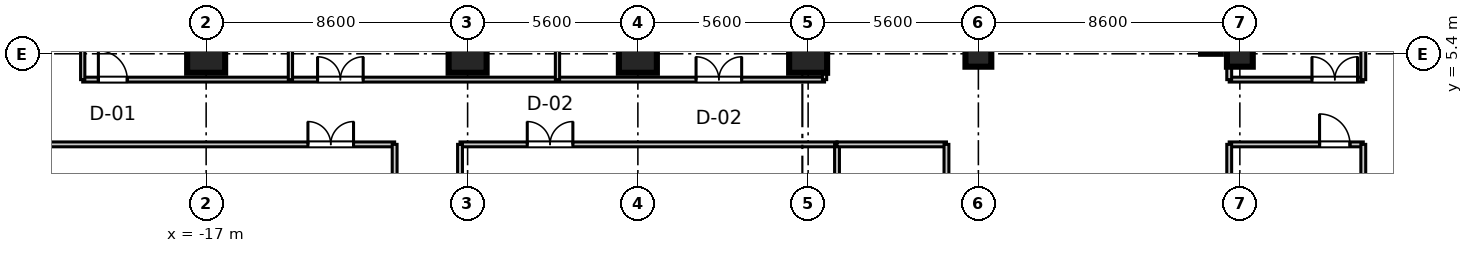
"""IFC4 building model, lengths in metres.
Left out: names, types, materials, properties, quantities, classifications, styles, units other than length and angle.
Written with IfcOpenShell. Run it as: python <this file> out.ifc"""

import sys

from ifc_helpers import new_model, si_unit, direction, frame, frame_2d, origin, origin_2d, place, context, subcontext, project, spatial, rectangle, extrude, source, transform, mapped, element, fill, save


model = new_model("IFC4")
c1 = context("Model", 3, precision=1e-05, world=origin(), true_north=direction((0.0, 1.0)))
c2 = subcontext(c1, "Body", "Model", "MODEL_VIEW")
j1 = project(units=[si_unit("LENGTHUNIT", "METRE"), si_unit("PLANEANGLEUNIT", "RADIAN")], contexts=[c1])
p1 = place(None, origin())
s1 = spatial("IfcSite", under=j1, at=p1, CompositionType="ELEMENT")
p2 = place(p1, origin())
s2 = spatial("IfcBuilding", under=s1, at=p2, CompositionType="ELEMENT")
p3 = place(p2, frame((0.0, 0.0, 110.2)))
s3 = spatial("IfcBuildingStorey", under=s2, at=p3, CompositionType="ELEMENT", Elevation=110.2)
m1 = source(origin(), c2, "Body", "SweptSolid", [
    extrude(rectangle(XDim=1.25, YDim=1.25, at=origin_2d()), origin(), (0.0, 0.0, 1.0), 3.605),
])
for number, where, z_axis, x_axis in (
    (1, (-17.0, 5.4, 0.0), (0.0, 0.0, 1.0), (1.0, 0.0, 0.0)),
    (2, (-8.4, 5.4, 0.0), (0.0, 0.0, 1.0), (1.0, 0.0, 0.0)),
    (3, (-2.8, 5.4, 0.0), (0.0, 0.0, 1.0), (1.0, 0.0, 0.0)),
    (4, (2.8, 5.4, 0.0), (0.0, 0.0, 1.0), (1.0, 0.0, 0.0)),
):
    element("IfcColumn", number, at=place(p3, frame(where, z_axis=z_axis, x_axis=x_axis)), inside=s3, PredefinedType="COLUMN", context=c2, shape_type="MappedRepresentation", body=[
        mapped(m1, transform((0.0, 0.0, 0.0), scale=1.0)),
    ])
m2 = source(origin(), c2, "Body", "SweptSolid", [
    extrude(rectangle(XDim=0.85, YDim=0.85, at=origin_2d()), origin(), (0.0, 0.0, 1.0), 3.605),
])
for number, where, z_axis, x_axis in (
    (5, (8.4, 5.4, 0.0), (0.0, 0.0, 1.0), (1.0, 0.0, 0.0)),
    (6, (17.0, 5.4, 0.0), (0.0, 0.0, 1.0), (1.0, 0.0, 0.0)),
):
    element("IfcColumn", number, at=place(p3, frame(where, z_axis=z_axis, x_axis=x_axis)), inside=s3, PredefinedType="PILASTER", context=c2, shape_type="MappedRepresentation", body=[
        mapped(m2, transform((0.0, 0.0, 0.0), scale=1.0)),
    ])
m3 = source(origin(), c2, "Body", "SweptSolid", [
    extrude(rectangle(XDim=11.6, YDim=0.65, at=frame_2d((5.8, 0.0))), origin(), (0.0, 0.0, 1.0), 3.38),
])
p4 = place(p3, frame((16.05, 5.4, 0.0), z_axis=(0.0, 0.0, 1.0), x_axis=(0.0, 1.0, 0.0)))
e7 = element("IfcWall", 7, at=p4, inside=s3, PredefinedType="SHEAR", context=c2, shape_type="MappedRepresentation", body=[
    mapped(m3, transform((0.0, 0.0, 0.0), scale=1.0)),
])
m4 = source(origin(), c2, "Body", "SweptSolid", [
    extrude(rectangle(XDim=4.41, YDim=0.16, at=frame_2d((2.205, 0.0))), origin(), (0.0, 0.0, 1.0), 2.72),
])
p5 = place(p3, frame((16.65, 4.55, 0.0), z_axis=(0.0, 0.0, 1.0), x_axis=(1.0, 0.0, 0.0)))
e8 = element("IfcWall", 8, at=p5, inside=s3, PredefinedType="PARTITIONING", context=c2, shape_type="MappedRepresentation", body=[
    mapped(m4, transform((0.0, 0.0, 0.0), scale=1.0)),
])
p6 = place(p5, frame((2.722, 0.0, 0.0)))
e9 = element("IfcOpeningElement", 9, at=p6, cuts=e8, PredefinedType="OPENING", context=c2, shape_type="SweptSolid", body=[
    extrude(rectangle(XDim=1.5, YDim=2.15, at=frame_2d((0.75, 1.075))), frame((0.0, 0.09, 0.0), z_axis=(0.0, -1.0, 0.0), x_axis=(1.0, 0.0, 0.0)), (0.0, 0.0, 1.0), 0.18),
])
m5 = source(origin(), c2, "Body", "SweptSolid", [
    extrude(rectangle(XDim=19.25, YDim=0.16, at=frame_2d((9.625, 0.0))), origin(), (0.0, 0.0, 1.0), 2.72),
])
p7 = place(p3, frame((16.65, 4.55, 0.0), z_axis=(0.0, 0.0, 1.0), x_axis=(0.0, 1.0, 0.0)))
e10 = element("IfcWall", 10, at=p7, inside=s3, PredefinedType="PARTITIONING", context=c2, shape_type="MappedRepresentation", body=[
    mapped(m5, transform((0.0, 0.0, 0.0), scale=1.0)),
])
m6 = source(origin(), c2, "Body", "SweptSolid", [
    extrude(rectangle(XDim=17.83, YDim=0.16, at=frame_2d((8.915, 0.0))), origin(), (0.0, 0.0, 1.0), 2.72),
])
p8 = place(p3, frame((21.06, 4.55, 0.0), z_axis=(0.0, 0.0, 1.0), x_axis=(0.0, 1.0, 0.0)))
e11 = element("IfcWall", 11, at=p8, inside=s3, PredefinedType="PARTITIONING", context=c2, shape_type="MappedRepresentation", body=[
    mapped(m6, transform((0.0, 0.0, 0.0), scale=1.0)),
])
m7 = source(origin(), c2, "Body", "SweptSolid", [
    extrude(rectangle(XDim=24.4, YDim=0.16, at=frame_2d((12.2, 0.0))), origin(), (0.0, 0.0, 1.0), 2.72),
])
p9 = place(p3, frame((-21.06, 4.55, 0.0), z_axis=(0.0, 0.0, 1.0), x_axis=(1.0, 0.0, 0.0)))
e12 = element("IfcWall", 12, at=p9, inside=s3, PredefinedType="PARTITIONING", context=c2, shape_type="MappedRepresentation", body=[
    mapped(m7, transform((0.0, 0.0, 0.0), scale=1.0)),
])
p10 = place(p9, frame((0.515, 0.0, 0.0)))
e13 = element("IfcOpeningElement", 13, at=p10, cuts=e12, PredefinedType="OPENING", context=c2, shape_type="SweptSolid", body=[
    extrude(rectangle(XDim=0.95, YDim=2.1, at=frame_2d((0.475, 1.05))), frame((0.0, 0.09, 0.0), z_axis=(0.0, -1.0, 0.0), x_axis=(1.0, 0.0, 0.0)), (0.0, 0.0, 1.0), 0.18),
])
p11 = place(p9, frame((7.725, 0.0, 0.0)))
e14 = element("IfcOpeningElement", 14, at=p11, cuts=e12, PredefinedType="OPENING", context=c2, shape_type="SweptSolid", body=[
    extrude(rectangle(XDim=1.5, YDim=2.15, at=frame_2d((0.75, 1.075))), frame((0.0, 0.09, 0.0), z_axis=(0.0, -1.0, 0.0), x_axis=(1.0, 0.0, 0.0)), (0.0, 0.0, 1.0), 0.18),
])
p12 = place(p9, frame((20.174, 0.0, 0.0)))
e15 = element("IfcOpeningElement", 15, at=p12, cuts=e12, PredefinedType="OPENING", context=c2, shape_type="SweptSolid", body=[
    extrude(rectangle(XDim=1.5, YDim=2.15, at=frame_2d((0.75, 1.075))), frame((0.0, 0.09, 0.0), z_axis=(0.0, -1.0, 0.0), x_axis=(1.0, 0.0, 0.0)), (0.0, 0.0, 1.0), 0.18),
])
m8 = source(origin(), c2, "Body", "SweptSolid", [
    extrude(rectangle(XDim=17.83, YDim=0.14, at=frame_2d((8.915, 0.0))), origin(), (0.0, 0.0, 1.0), 2.72),
])
p13 = place(p3, frame((-21.06, 4.55, 0.0), z_axis=(0.0, 0.0, 1.0), x_axis=(0.0, 1.0, 0.0)))
e16 = element("IfcWall", 16, at=p13, inside=s3, PredefinedType="PARTITIONING", context=c2, shape_type="MappedRepresentation", body=[
    mapped(m8, transform((0.0, 0.0, 0.0), scale=1.0)),
])
m9 = source(origin(), c2, "Body", "SweptSolid", [
    extrude(rectangle(XDim=19.25, YDim=0.14, at=frame_2d((9.625, 0.0))), origin(), (0.0, 0.0, 1.0), 2.72),
])
for number, where, z_axis, x_axis in (
    (17, (3.34, 4.55, 0.0), (0.0, 0.0, 1.0), (0.0, 1.0, 0.0)),
    (18, (-14.228, 4.55, 0.0), (0.0, 0.0, 1.0), (0.0, 1.0, 0.0)),
    (19, (-5.444, 4.55, 0.0), (0.0, 0.0, 1.0), (0.0, 1.0, 0.0)),
):
    element("IfcWall", number, at=place(p3, frame(where, z_axis=z_axis, x_axis=x_axis)), inside=s3, PredefinedType="PARTITIONING", context=c2, shape_type="MappedRepresentation", body=[
        mapped(m9, transform((0.0, 0.0, 0.0), scale=1.0)),
    ])
m10 = source(origin(), c2, "Body", "SweptSolid", [
    extrude(rectangle(XDim=13.0, YDim=0.16, at=frame_2d((6.5, 0.0))), origin(), (0.0, 0.0, 1.0), 2.72),
])
p14 = place(p3, frame((-23.8, 2.42, 0.0), z_axis=(0.0, 0.0, 1.0), x_axis=(1.0, 0.0, 0.0)))
e20 = element("IfcWall", 20, at=p14, inside=s3, PredefinedType="PARTITIONING", context=c2, shape_type="MappedRepresentation", body=[
    mapped(m10, transform((0.0, 0.0, 0.0), scale=1.0)),
])
p15 = place(p14, frame((10.148, 0.0, 0.0)))
e21 = element("IfcOpeningElement", 21, at=p15, cuts=e20, PredefinedType="OPENING", context=c2, shape_type="SweptSolid", body=[
    extrude(rectangle(XDim=1.5, YDim=2.15, at=frame_2d((0.75, 1.075))), frame((0.0, 0.09, 0.0), z_axis=(0.0, -1.0, 0.0), x_axis=(1.0, 0.0, 0.0)), (0.0, 0.0, 1.0), 0.18),
])
m11 = source(origin(), c2, "Body", "SweptSolid", [
    extrude(rectangle(XDim=4.84, YDim=0.16, at=frame_2d((2.42, 0.0))), origin(), (0.0, 0.0, 1.0), 2.72),
])
p16 = place(p3, frame((-10.8, -2.42, 0.0), z_axis=(0.0, 0.0, 1.0), x_axis=(0.0, 1.0, 0.0)))
e22 = element("IfcWall", 22, at=p16, inside=s3, PredefinedType="PARTITIONING", context=c2, shape_type="MappedRepresentation", body=[
    mapped(m11, transform((0.0, 0.0, 0.0), scale=1.0)),
])
m12 = source(origin(), c2, "Body", "SweptSolid", [
    extrude(rectangle(XDim=12.4, YDim=0.16, at=frame_2d((6.2, 0.0))), origin(), (0.0, 0.0, 1.0), 2.72),
])
p17 = place(p3, frame((-8.65, 2.42, 0.0), z_axis=(0.0, 0.0, 1.0), x_axis=(1.0, 0.0, 0.0)))
e23 = element("IfcWall", 23, at=p17, inside=s3, PredefinedType="PARTITIONING", context=c2, shape_type="MappedRepresentation", body=[
    mapped(m12, transform((0.0, 0.0, 0.0), scale=1.0)),
])
p18 = place(p17, frame((2.212, 0.0, 0.0)))
e24 = element("IfcOpeningElement", 24, at=p18, cuts=e23, PredefinedType="OPENING", context=c2, shape_type="SweptSolid", body=[
    extrude(rectangle(XDim=1.5, YDim=2.15, at=frame_2d((0.75, 1.075))), frame((0.0, 0.09, 0.0), z_axis=(0.0, -1.0, 0.0), x_axis=(1.0, 0.0, 0.0)), (0.0, 0.0, 1.0), 0.18),
])
for number, where, z_axis, x_axis in (
    (25, (-8.65, -2.42, 0.0), (0.0, 0.0, 1.0), (0.0, 1.0, 0.0)),
    (26, (3.75, -2.42, 0.0), (0.0, 0.0, 1.0), (0.0, 1.0, 0.0)),
):
    element("IfcWall", number, at=place(p3, frame(where, z_axis=z_axis, x_axis=x_axis)), inside=s3, PredefinedType="PARTITIONING", context=c2, shape_type="MappedRepresentation", body=[
        mapped(m11, transform((0.0, 0.0, 0.0), scale=1.0)),
    ])
m13 = source(origin(), c2, "Body", "SweptSolid", [
    extrude(rectangle(XDim=3.6, YDim=0.16, at=frame_2d((1.8, 0.0))), origin(), (0.0, 0.0, 1.0), 2.72),
])
p19 = place(p3, frame((3.75, 2.42, 0.0), z_axis=(0.0, 0.0, 1.0), x_axis=(1.0, 0.0, 0.0)))
e27 = element("IfcWall", 27, at=p19, inside=s3, PredefinedType="PARTITIONING", context=c2, shape_type="MappedRepresentation", body=[
    mapped(m13, transform((0.0, 0.0, 0.0), scale=1.0)),
])
p20 = place(p3, frame((7.35, -2.42, 0.0), z_axis=(0.0, 0.0, 1.0), x_axis=(0.0, 1.0, 0.0)))
e28 = element("IfcWall", 28, at=p20, inside=s3, PredefinedType="PARTITIONING", context=c2, shape_type="MappedRepresentation", body=[
    mapped(m11, transform((0.0, 0.0, 0.0), scale=1.0)),
])
p21 = place(p3, frame((16.65, 2.42, 0.0), z_axis=(0.0, 0.0, 1.0), x_axis=(1.0, 0.0, 0.0)))
e29 = element("IfcWall", 29, at=p21, inside=s3, PredefinedType="PARTITIONING", context=c2, shape_type="MappedRepresentation", body=[
    mapped(m4, transform((0.0, 0.0, 0.0), scale=1.0)),
])
p22 = place(p21, frame((2.972, 0.0, 0.0)))
e30 = element("IfcOpeningElement", 30, at=p22, cuts=e29, PredefinedType="OPENING", context=c2, shape_type="SweptSolid", body=[
    extrude(rectangle(XDim=1.0, YDim=2.1, at=frame_2d((0.5, 1.05))), frame((0.0, 0.09, 0.0), z_axis=(0.0, -1.0, 0.0), x_axis=(1.0, 0.0, 0.0)), (0.0, 0.0, 1.0), 0.18),
])
for number, where, z_axis, x_axis in (
    (31, (16.65, -2.42, 0.0), (0.0, 0.0, 1.0), (0.0, 1.0, 0.0)),
    (32, (21.06, -2.42, 0.0), (0.0, 0.0, 1.0), (0.0, 1.0, 0.0)),
):
    element("IfcWall", number, at=place(p3, frame(where, z_axis=z_axis, x_axis=x_axis)), inside=s3, PredefinedType="PARTITIONING", context=c2, shape_type="MappedRepresentation", body=[
        mapped(m11, transform((0.0, 0.0, 0.0), scale=1.0)),
    ])
m14 = source(origin(), c2, "Body", "SweptSolid", [
    extrude(rectangle(XDim=1.5, YDim=2.15, at=frame_2d((0.75, 1.075))), frame((0.0, 0.025, 0.0), z_axis=(0.0, -1.0, 0.0), x_axis=(1.0, 0.0, 0.0)), (0.0, 0.0, 1.0), 0.05),
])
p23 = place(p6, origin())
e33 = element("IfcDoor", 33, at=p23, inside=s3, OperationType="DOUBLE_DOOR_SINGLE_SWING", PredefinedType="DOOR", context=c2, shape_type="MappedRepresentation", body=[
    mapped(m14, transform((0.0, 0.0, 0.0), scale=1.0)),
])
fill(e9, e33)
m15 = source(origin(), c2, "Body", "SweptSolid", [
    extrude(rectangle(XDim=0.95, YDim=2.1, at=frame_2d((0.475, 1.05))), frame((0.0, 0.025, 0.0), z_axis=(0.0, -1.0, 0.0), x_axis=(1.0, 0.0, 0.0)), (0.0, 0.0, 1.0), 0.05),
])
p24 = place(p10, origin())
e34 = element("IfcDoor", 34, at=p24, inside=s3, OperationType="SINGLE_SWING_LEFT", PredefinedType="DOOR", context=c2, shape_type="MappedRepresentation", body=[
    mapped(m15, transform((0.0, 0.0, 0.0), scale=1.0)),
])
fill(e13, e34)
p25 = place(p11, origin())
e35 = element("IfcDoor", 35, at=p25, inside=s3, OperationType="DOUBLE_DOOR_SINGLE_SWING", PredefinedType="DOOR", context=c2, shape_type="MappedRepresentation", body=[
    mapped(m14, transform((0.0, 0.0, 0.0), scale=1.0)),
])
fill(e14, e35)
p26 = place(p12, origin())
e36 = element("IfcDoor", 36, at=p26, inside=s3, OperationType="DOUBLE_DOOR_SINGLE_SWING", PredefinedType="DOOR", context=c2, shape_type="MappedRepresentation", body=[
    mapped(m14, transform((0.0, 0.0, 0.0), scale=1.0)),
])
fill(e15, e36)
p27 = place(p15, origin())
e37 = element("IfcDoor", 37, at=p27, inside=s3, OperationType="DOUBLE_DOOR_SINGLE_SWING", PredefinedType="DOOR", context=c2, shape_type="MappedRepresentation", body=[
    mapped(m14, transform((0.0, 0.0, 0.0), scale=1.0)),
])
fill(e21, e37)
p28 = place(p18, frame((1.5, 0.0, 0.0), z_axis=(0.0, 0.0, 1.0), x_axis=(-1.0, 0.0, 0.0)))
e38 = element("IfcDoor", 38, at=p28, inside=s3, OperationType="DOUBLE_DOOR_SINGLE_SWING", PredefinedType="DOOR", context=c2, shape_type="MappedRepresentation", body=[
    mapped(m14, transform((0.0, 0.0, 0.0), scale=1.0)),
])
fill(e24, e38)
m16 = source(origin(), c2, "Body", "SweptSolid", [
    extrude(rectangle(XDim=1.0, YDim=2.1, at=frame_2d((0.5, 1.05))), frame((0.0, 0.025, 0.0), z_axis=(0.0, -1.0, 0.0), x_axis=(1.0, 0.0, 0.0)), (0.0, 0.0, 1.0), 0.05),
])
p29 = place(p22, frame((1.0, 0.0, 0.0), z_axis=(0.0, 0.0, 1.0), x_axis=(-1.0, 0.0, 0.0)))
e39 = element("IfcDoor", 39, at=p29, inside=s3, OperationType="SINGLE_SWING_LEFT", PredefinedType="DOOR", context=c2, shape_type="MappedRepresentation", body=[
    mapped(m16, transform((0.0, 0.0, 0.0), scale=1.0)),
])
fill(e30, e39)
save(model, sys.argv[1])
